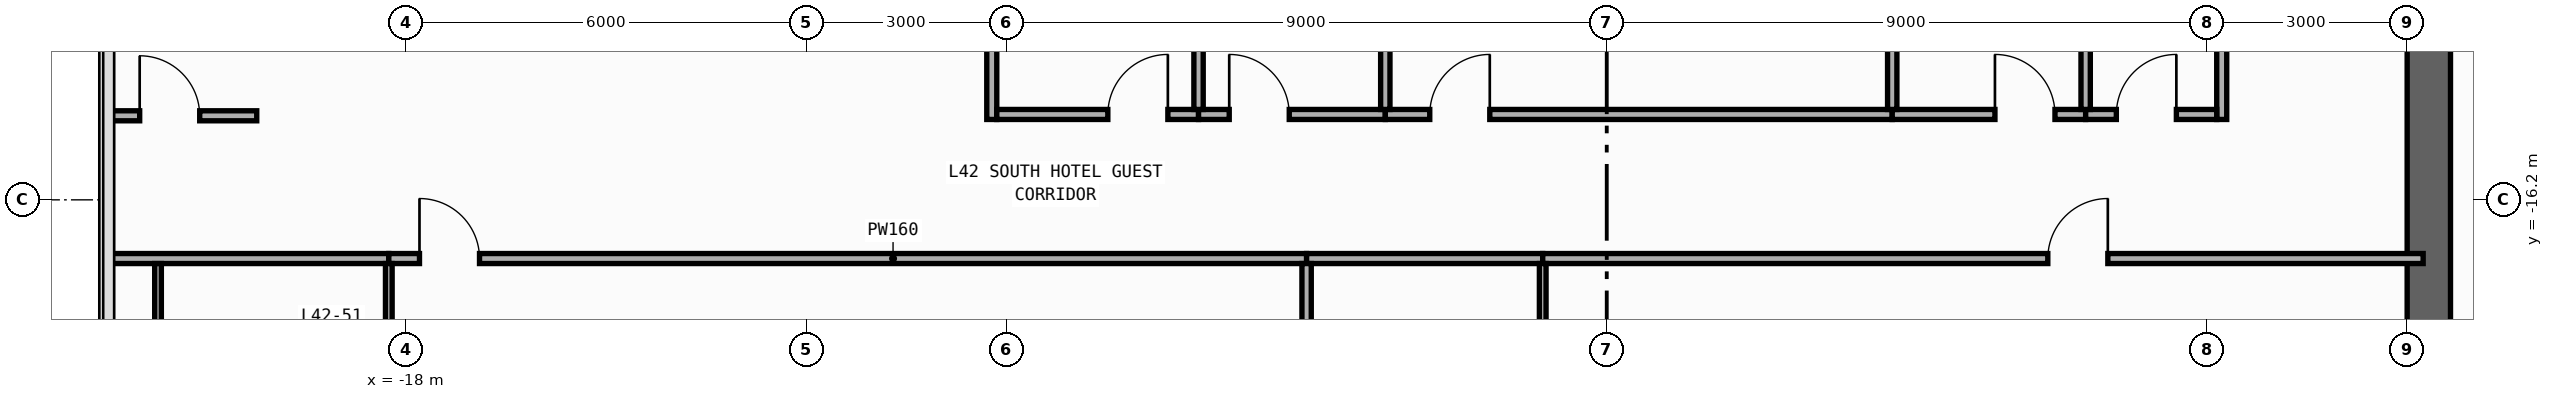
"""IFC4 building model, lengths in metres.
Left out: names, types, materials, properties, quantities, classifications, styles, units other than length and angle.
Written with IfcOpenShell. Run it as: python <this file> out.ifc"""

import sys

from ifc_helpers import new_model, si_unit, direction, frame, frame_2d, origin, place, context, subcontext, project, spatial, rectangle, extrude, element, fill, save


model = new_model("IFC4")
c1 = context("Model", 3, precision=1e-05, world=origin(), true_north=direction((0.0, 1.0)))
c2 = subcontext(c1, "Body", "Model", "MODEL_VIEW")
j1 = project(units=[si_unit("LENGTHUNIT", "METRE"), si_unit("PLANEANGLEUNIT", "RADIAN")], contexts=[c1])
p1 = place(None, origin())
s1 = spatial("IfcSite", under=j1, at=p1, CompositionType="ELEMENT")
p2 = place(p1, origin())
s2 = spatial("IfcBuilding", under=s1, at=p2, CompositionType="ELEMENT")
p3 = place(p2, frame((0.0, 0.0, 184.0)))
s3 = spatial("IfcBuildingStorey", under=s2, at=p3, CompositionType="ELEMENT", Elevation=184.0)
p4 = place(p3, frame((12.325, -19.8, 0.0), z_axis=(0.0, 0.0, 1.0), x_axis=(0.0, 1.0, 0.0)))
e1 = element("IfcWall", 1, at=p4, inside=s3, PredefinedType="SHEAR", context=c2, shape_type="SweptSolid", body=[
    extrude(rectangle(XDim=27.0, YDim=0.65, at=frame_2d((13.5, 0.0))), origin(), (0.0, 0.0, 1.0), 3.54),
])
p5 = place(p4, frame((23.05, 0.0, 0.0)))
e2 = element("IfcOpeningElement", 2, at=p5, cuts=e1, PredefinedType="OPENING", context=c2, shape_type="SweptSolid", body=[
    extrude(rectangle(XDim=1.1, YDim=2.2, at=frame_2d((0.55, 1.1))), frame((0.0, 0.335, 0.0), z_axis=(0.0, -1.0, 0.0), x_axis=(1.0, 0.0, 0.0)), (0.0, 0.0, 1.0), 0.67),
])
p6 = place(p4, frame((19.85, 0.0, 0.0)))
e3 = element("IfcOpeningElement", 3, at=p6, cuts=e1, PredefinedType="OPENING", context=c2, shape_type="SweptSolid", body=[
    extrude(rectangle(XDim=1.1, YDim=2.2, at=frame_2d((0.55, 1.1))), frame((0.0, 0.335, 0.0), z_axis=(0.0, -1.0, 0.0), x_axis=(1.0, 0.0, 0.0)), (0.0, 0.0, 1.0), 0.67),
])
p7 = place(p4, frame((16.65, 0.0, 0.0)))
e4 = element("IfcOpeningElement", 4, at=p7, cuts=e1, PredefinedType="OPENING", context=c2, shape_type="SweptSolid", body=[
    extrude(rectangle(XDim=1.1, YDim=2.2, at=frame_2d((0.55, 1.1))), frame((0.0, 0.335, 0.0), z_axis=(0.0, -1.0, 0.0), x_axis=(1.0, 0.0, 0.0)), (0.0, 0.0, 1.0), 0.67),
])
p8 = place(p4, frame((6.275, 0.0, 0.0)))
e5 = element("IfcOpeningElement", 5, at=p8, cuts=e1, PredefinedType="OPENING", context=c2, shape_type="SweptSolid", body=[
    extrude(rectangle(XDim=0.85, YDim=2.1, at=frame_2d((0.425, 1.05))), frame((0.0, 0.335, 0.0), z_axis=(0.0, -1.0, 0.0), x_axis=(1.0, 0.0, 0.0)), (0.0, 0.0, 1.0), 0.67),
])
p9 = place(p4, frame((8.575, 0.0, 0.0)))
e6 = element("IfcOpeningElement", 6, at=p9, cuts=e1, PredefinedType="OPENING", context=c2, shape_type="SweptSolid", body=[
    extrude(rectangle(XDim=0.85, YDim=2.1, at=frame_2d((0.425, 1.05))), frame((0.0, 0.335, 0.0), z_axis=(0.0, -1.0, 0.0), x_axis=(1.0, 0.0, 0.0)), (0.0, 0.0, 1.0), 0.67),
])
p10 = place(p4, frame((10.675, 0.0, 0.0)))
e7 = element("IfcOpeningElement", 7, at=p10, cuts=e1, PredefinedType="OPENING", context=c2, shape_type="SweptSolid", body=[
    extrude(rectangle(XDim=0.85, YDim=2.1, at=frame_2d((0.425, 1.05))), frame((0.0, 0.335, 0.0), z_axis=(0.0, -1.0, 0.0), x_axis=(1.0, 0.0, 0.0)), (0.0, 0.0, 1.0), 0.67),
])
p11 = place(p4, frame((12.725, 0.0, 0.0)))
e8 = element("IfcOpeningElement", 8, at=p11, cuts=e1, PredefinedType="OPENING", context=c2, shape_type="SweptSolid", body=[
    extrude(rectangle(XDim=1.15, YDim=2.2, at=frame_2d((0.575, 1.1))), frame((0.0, 0.335, 0.0), z_axis=(0.0, -1.0, 0.0), x_axis=(1.0, 0.0, 0.0)), (0.0, 0.0, 1.0), 0.67),
])
p12 = place(p4, frame((25.125, 0.0, 0.0)))
e9 = element("IfcOpeningElement", 9, at=p12, cuts=e1, PredefinedType="OPENING", context=c2, shape_type="SweptSolid", body=[
    extrude(rectangle(XDim=0.85, YDim=2.1, at=frame_2d((0.425, 1.05))), frame((0.0, 0.335, 0.0), z_axis=(0.0, -1.0, 0.0), x_axis=(1.0, 0.0, 0.0)), (0.0, 0.0, 1.0), 0.67),
])
p13 = place(p3, frame((-9.22, -14.995, 0.0), z_axis=(0.0, 0.0, 1.0), x_axis=(0.0, 1.0, 0.0)))
e10 = element("IfcWall", 10, at=p13, inside=s3, PredefinedType="PARTITIONING", context=c2, shape_type="SweptSolid", body=[
    extrude(rectangle(XDim=9.195, YDim=0.15, at=frame_2d((4.598, 0.0))), origin(), (0.0, 0.0, 1.0), 2.952),
])
p14 = place(p13, frame((7.835, 0.0, 0.0)))
e11 = element("IfcOpeningElement", 11, at=p14, cuts=e10, PredefinedType="OPENING", context=c2, shape_type="SweptSolid", body=[
    extrude(rectangle(XDim=0.9, YDim=2.15, at=frame_2d((0.45, 1.075))), frame((0.0, 0.085, 0.0), z_axis=(0.0, -1.0, 0.0), x_axis=(1.0, 0.0, 0.0)), (0.0, 0.0, 1.0), 0.17),
])
p15 = place(p3, frame((9.22, -14.995, 0.0), z_axis=(0.0, 0.0, 1.0), x_axis=(0.0, 1.0, 0.0)))
e12 = element("IfcWall", 12, at=p15, inside=s3, PredefinedType="PARTITIONING", context=c2, shape_type="SweptSolid", body=[
    extrude(rectangle(XDim=9.195, YDim=0.15, at=frame_2d((4.598, 0.0))), origin(), (0.0, 0.0, 1.0), 2.952),
])
p16 = place(p15, frame((7.835, 0.0, 0.0)))
e13 = element("IfcOpeningElement", 13, at=p16, cuts=e12, PredefinedType="OPENING", context=c2, shape_type="SweptSolid", body=[
    extrude(rectangle(XDim=0.9, YDim=2.15, at=frame_2d((0.45, 1.075))), frame((0.0, 0.085, 0.0), z_axis=(0.0, -1.0, 0.0), x_axis=(1.0, 0.0, 0.0)), (0.0, 0.0, 1.0), 0.17),
])
p17 = place(p3, frame((-9.145, -14.92, 0.0), z_axis=(0.0, 0.0, 1.0), x_axis=(1.0, 0.0, 0.0)))
e14 = element("IfcWall", 14, at=p17, inside=s3, PredefinedType="PARTITIONING", context=c2, shape_type="SweptSolid", body=[
    extrude(rectangle(XDim=3.025, YDim=0.15, at=frame_2d((1.512, 0.0))), origin(), (0.0, 0.0, 1.0), 3.54),
])
p18 = place(p17, frame((1.665, 0.0, 0.0)))
e15 = element("IfcOpeningElement", 15, at=p18, cuts=e14, PredefinedType="OPENING", context=c2, shape_type="SweptSolid", body=[
    extrude(rectangle(XDim=0.9, YDim=2.15, at=frame_2d((0.45, 1.075))), frame((0.0, 0.085, 0.0), z_axis=(0.0, -1.0, 0.0), x_axis=(1.0, 0.0, 0.0)), (0.0, 0.0, 1.0), 0.17),
])
p19 = place(p3, frame((-6.12, -14.92, 0.0), z_axis=(0.0, 0.0, 1.0), x_axis=(1.0, 0.0, 0.0)))
e16 = element("IfcWall", 16, at=p19, inside=s3, PredefinedType="PARTITIONING", context=c2, shape_type="SweptSolid", body=[
    extrude(rectangle(XDim=2.8, YDim=0.15, at=frame_2d((1.4, 0.0))), origin(), (0.0, 0.0, 1.0), 3.54),
])
p20 = place(p19, frame((0.46, 0.0, 0.0)))
e17 = element("IfcOpeningElement", 17, at=p20, cuts=e16, PredefinedType="OPENING", context=c2, shape_type="SweptSolid", body=[
    extrude(rectangle(XDim=0.9, YDim=2.15, at=frame_2d((0.45, 1.075))), frame((0.0, 0.085, 0.0), z_axis=(0.0, -1.0, 0.0), x_axis=(1.0, 0.0, 0.0)), (0.0, 0.0, 1.0), 0.17),
])
p21 = place(p3, frame((-3.32, -14.92, 0.0), z_axis=(0.0, 0.0, 1.0), x_axis=(1.0, 0.0, 0.0)))
e18 = element("IfcWall", 18, at=p21, inside=s3, PredefinedType="PARTITIONING", context=c2, shape_type="SweptSolid", body=[
    extrude(rectangle(XDim=7.6, YDim=0.15, at=frame_2d((3.8, 0.0))), origin(), (0.0, 0.0, 1.0), 3.54),
])
p22 = place(p21, frame((0.667, 0.0, 0.0)))
e19 = element("IfcOpeningElement", 19, at=p22, cuts=e18, PredefinedType="OPENING", context=c2, shape_type="SweptSolid", body=[
    extrude(rectangle(XDim=0.9, YDim=2.15, at=frame_2d((0.45, 1.075))), frame((0.0, 0.085, 0.0), z_axis=(0.0, -1.0, 0.0), x_axis=(1.0, 0.0, 0.0)), (0.0, 0.0, 1.0), 0.17),
])
p23 = place(p3, frame((4.28, -14.92, 0.0), z_axis=(0.0, 0.0, 1.0), x_axis=(1.0, 0.0, 0.0)))
e20 = element("IfcWall", 20, at=p23, inside=s3, PredefinedType="PARTITIONING", context=c2, shape_type="SweptSolid", body=[
    extrude(rectangle(XDim=2.9, YDim=0.15, at=frame_2d((1.45, 0.0))), origin(), (0.0, 0.0, 1.0), 3.54),
])
p24 = place(p23, frame((1.54, 0.0, 0.0)))
e21 = element("IfcOpeningElement", 21, at=p24, cuts=e20, PredefinedType="OPENING", context=c2, shape_type="SweptSolid", body=[
    extrude(rectangle(XDim=0.9, YDim=2.15, at=frame_2d((0.45, 1.075))), frame((0.0, 0.085, 0.0), z_axis=(0.0, -1.0, 0.0), x_axis=(1.0, 0.0, 0.0)), (0.0, 0.0, 1.0), 0.17),
])
p25 = place(p3, frame((7.18, -14.92, 0.0), z_axis=(0.0, 0.0, 1.0), x_axis=(1.0, 0.0, 0.0)))
e22 = element("IfcWall", 22, at=p25, inside=s3, PredefinedType="PARTITIONING", context=c2, shape_type="SweptSolid", body=[
    extrude(rectangle(XDim=1.965, YDim=0.15, at=frame_2d((0.982, 0.0))), origin(), (0.0, 0.0, 1.0), 3.54),
])
p26 = place(p25, frame((0.46, 0.0, 0.0)))
e23 = element("IfcOpeningElement", 23, at=p26, cuts=e22, PredefinedType="OPENING", context=c2, shape_type="SweptSolid", body=[
    extrude(rectangle(XDim=0.9, YDim=2.15, at=frame_2d((0.45, 1.075))), frame((0.0, 0.085, 0.0), z_axis=(0.0, -1.0, 0.0), x_axis=(1.0, 0.0, 0.0)), (0.0, 0.0, 1.0), 0.17),
])
p27 = place(p3, frame((-22.455, -17.08, 0.0), z_axis=(0.0, 0.0, 1.0), x_axis=(1.0, 0.0, 0.0)))
e24 = element("IfcWall", 24, at=p27, inside=s3, PredefinedType="PARTITIONING", context=c2, shape_type="SweptSolid", body=[
    extrude(rectangle(XDim=4.195, YDim=0.15, at=frame_2d((2.098, 0.0))), origin(), (0.0, 0.0, 1.0), 3.54),
])
p28 = place(p3, frame((-18.26, -17.08, 0.0), z_axis=(0.0, 0.0, 1.0), x_axis=(1.0, 0.0, 0.0)))
e25 = element("IfcWall", 25, at=p28, inside=s3, PredefinedType="PARTITIONING", context=c2, shape_type="SweptSolid", body=[
    extrude(rectangle(XDim=13.76, YDim=0.15, at=frame_2d((6.88, 0.0))), origin(), (0.0, 0.0, 1.0), 3.54),
])
p29 = place(p28, frame((0.46, 0.0, 0.0)))
e26 = element("IfcOpeningElement", 26, at=p29, cuts=e25, PredefinedType="OPENING", context=c2, shape_type="SweptSolid", body=[
    extrude(rectangle(XDim=0.9, YDim=2.15, at=frame_2d((0.45, 1.075))), frame((0.0, 0.085, 0.0), z_axis=(0.0, -1.0, 0.0), x_axis=(1.0, 0.0, 0.0)), (0.0, 0.0, 1.0), 0.17),
])
p30 = place(p3, frame((-4.5, -17.08, 0.0), z_axis=(0.0, 0.0, 1.0), x_axis=(1.0, 0.0, 0.0)))
e27 = element("IfcWall", 27, at=p30, inside=s3, PredefinedType="PARTITIONING", context=c2, shape_type="SweptSolid", body=[
    extrude(rectangle(XDim=3.54, YDim=0.15, at=frame_2d((1.77, 0.0))), origin(), (0.0, 0.0, 1.0), 3.54),
])
p31 = place(p3, frame((-0.96, -17.08, 0.0), z_axis=(0.0, 0.0, 1.0), x_axis=(1.0, 0.0, 0.0)))
e28 = element("IfcWall", 28, at=p31, inside=s3, PredefinedType="PARTITIONING", context=c2, shape_type="SweptSolid", body=[
    extrude(rectangle(XDim=13.2, YDim=0.15, at=frame_2d((6.6, 0.0))), origin(), (0.0, 0.0, 1.0), 3.54),
])
p32 = place(p31, frame((7.573, 0.0, 0.0)))
e29 = element("IfcOpeningElement", 29, at=p32, cuts=e28, PredefinedType="OPENING", context=c2, shape_type="SweptSolid", body=[
    extrude(rectangle(XDim=0.9, YDim=2.15, at=frame_2d((0.45, 1.075))), frame((0.0, 0.085, 0.0), z_axis=(0.0, -1.0, 0.0), x_axis=(1.0, 0.0, 0.0)), (0.0, 0.0, 1.0), 0.17),
])
p33 = place(p3, frame((-22.455, -14.94, 0.0), z_axis=(0.0, 0.0, 1.0), x_axis=(1.0, 0.0, 0.0)))
e30 = element("IfcWall", 30, at=p33, inside=s3, PredefinedType="PARTITIONING", context=c2, shape_type="SweptSolid", body=[
    extrude(rectangle(XDim=2.215, YDim=0.15, at=frame_2d((1.107, 0.0))), origin(), (0.0, 0.0, 1.0), 3.54),
])
p34 = place(p33, frame((0.46, 0.0, 0.0)))
e31 = element("IfcOpeningElement", 31, at=p34, cuts=e30, PredefinedType="OPENING", context=c2, shape_type="SweptSolid", body=[
    extrude(rectangle(XDim=0.9, YDim=2.15, at=frame_2d((0.45, 1.075))), frame((0.0, 0.085, 0.0), z_axis=(0.0, -1.0, 0.0), x_axis=(1.0, 0.0, 0.0)), (0.0, 0.0, 1.0), 0.17),
])
p35 = place(p3, frame((-6.12, -14.845, 0.0), z_axis=(0.0, 0.0, 1.0), x_axis=(0.0, 1.0, 0.0)))
e32 = element("IfcWall", 32, at=p35, inside=s3, PredefinedType="PARTITIONING", context=c2, shape_type="SweptSolid", body=[
    extrude(rectangle(XDim=8.975, YDim=0.14, at=frame_2d((4.487, 0.0))), origin(), (0.0, 0.0, 1.0), 3.54),
])
p36 = place(p3, frame((-3.32, -14.845, 0.0), z_axis=(0.0, 0.0, 1.0), x_axis=(0.0, 1.0, 0.0)))
e33 = element("IfcWall", 33, at=p36, inside=s3, PredefinedType="PARTITIONING", context=c2, shape_type="SweptSolid", body=[
    extrude(rectangle(XDim=9.115, YDim=0.14, at=frame_2d((4.558, 0.0))), origin(), (0.0, 0.0, 1.0), 3.54),
])
for number, where, z_axis, x_axis in (
    (34, (4.28, -14.845, 0.0), (0.0, 0.0, 1.0), (0.0, 1.0, 0.0)),
    (35, (7.18, -14.845, 0.0), (0.0, 0.0, 1.0), (0.0, 1.0, 0.0)),
):
    element("IfcWall", number, at=place(p3, frame(where, z_axis=z_axis, x_axis=x_axis)), inside=s3, PredefinedType="PARTITIONING", context=c2, shape_type="SweptSolid", body=[
        extrude(rectangle(XDim=2.885, YDim=0.14, at=frame_2d((1.442, 0.0))), origin(), (0.0, 0.0, 1.0), 3.54),
    ])
p37 = place(p3, frame((-18.26, -20.12, 0.0), z_axis=(0.0, 0.0, 1.0), x_axis=(0.0, 1.0, 0.0)))
e36 = element("IfcWall", 36, at=p37, inside=s3, PredefinedType="PARTITIONING", context=c2, shape_type="SweptSolid", body=[
    extrude(rectangle(XDim=2.965, YDim=0.1, at=frame_2d((1.482, 0.0))), origin(), (0.0, 0.0, 1.0), 3.54),
])
p38 = place(p37, frame((0.46, 0.0, 0.0)))
e37 = element("IfcOpeningElement", 37, at=p38, cuts=e36, PredefinedType="OPENING", context=c2, shape_type="SweptSolid", body=[
    extrude(rectangle(XDim=0.8, YDim=2.1, at=frame_2d((0.4, 1.05))), frame((0.0, 0.06, 0.0), z_axis=(0.0, -1.0, 0.0), x_axis=(1.0, 0.0, 0.0)), (0.0, 0.0, 1.0), 0.12),
])
p39 = place(p3, frame((-4.5, -20.17, 0.0), z_axis=(0.0, 0.0, 1.0), x_axis=(0.0, 1.0, 0.0)))
e38 = element("IfcWall", 38, at=p39, inside=s3, PredefinedType="PARTITIONING", context=c2, shape_type="SweptSolid", body=[
    extrude(rectangle(XDim=3.015, YDim=0.14, at=frame_2d((1.507, 0.0))), origin(), (0.0, 0.0, 1.0), 3.54),
])
for number, where, z_axis, x_axis in (
    (39, (-0.96, -20.12, 0.0), (0.0, 0.0, 1.0), (0.0, 1.0, 0.0)),
    (40, (-21.72, -20.12, 0.0), (0.0, 0.0, 1.0), (0.0, 1.0, 0.0)),
):
    element("IfcWall", number, at=place(p3, frame(where, z_axis=z_axis, x_axis=x_axis)), inside=s3, PredefinedType="PARTITIONING", context=c2, shape_type="SweptSolid", body=[
        extrude(rectangle(XDim=2.965, YDim=0.1, at=frame_2d((1.482, 0.0))), origin(), (0.0, 0.0, 1.0), 3.54),
    ])
p40 = place(p18, origin())
e41 = element("IfcDoor", 41, at=p40, inside=s3, OperationType="SINGLE_SWING_RIGHT", PredefinedType="DOOR", context=c2, shape_type="SweptSolid", body=[
    extrude(rectangle(XDim=0.9, YDim=2.15, at=frame_2d((0.45, 1.075))), frame((0.0, 0.025, 0.0), z_axis=(0.0, -1.0, 0.0), x_axis=(1.0, 0.0, 0.0)), (0.0, 0.0, 1.0), 0.05),
])
fill(e15, e41)
p41 = place(p20, origin())
e42 = element("IfcDoor", 42, at=p41, inside=s3, OperationType="SINGLE_SWING_LEFT", PredefinedType="DOOR", context=c2, shape_type="SweptSolid", body=[
    extrude(rectangle(XDim=0.9, YDim=2.15, at=frame_2d((0.45, 1.075))), frame((0.0, 0.025, 0.0), z_axis=(0.0, -1.0, 0.0), x_axis=(1.0, 0.0, 0.0)), (0.0, 0.0, 1.0), 0.05),
])
fill(e17, e42)
p42 = place(p22, origin())
e43 = element("IfcDoor", 43, at=p42, inside=s3, OperationType="SINGLE_SWING_RIGHT", PredefinedType="DOOR", context=c2, shape_type="SweptSolid", body=[
    extrude(rectangle(XDim=0.9, YDim=2.15, at=frame_2d((0.45, 1.075))), frame((0.0, 0.025, 0.0), z_axis=(0.0, -1.0, 0.0), x_axis=(1.0, 0.0, 0.0)), (0.0, 0.0, 1.0), 0.05),
])
fill(e19, e43)
p43 = place(p24, origin())
e44 = element("IfcDoor", 44, at=p43, inside=s3, OperationType="SINGLE_SWING_LEFT", PredefinedType="DOOR", context=c2, shape_type="SweptSolid", body=[
    extrude(rectangle(XDim=0.9, YDim=2.15, at=frame_2d((0.45, 1.075))), frame((0.0, 0.025, 0.0), z_axis=(0.0, -1.0, 0.0), x_axis=(1.0, 0.0, 0.0)), (0.0, 0.0, 1.0), 0.05),
])
fill(e21, e44)
p44 = place(p26, origin())
e45 = element("IfcDoor", 45, at=p44, inside=s3, OperationType="SINGLE_SWING_RIGHT", PredefinedType="DOOR", context=c2, shape_type="SweptSolid", body=[
    extrude(rectangle(XDim=0.9, YDim=2.15, at=frame_2d((0.45, 1.075))), frame((0.0, 0.025, 0.0), z_axis=(0.0, -1.0, 0.0), x_axis=(1.0, 0.0, 0.0)), (0.0, 0.0, 1.0), 0.05),
])
fill(e23, e45)
p45 = place(p29, origin())
e46 = element("IfcDoor", 46, at=p45, inside=s3, OperationType="SINGLE_SWING_LEFT", PredefinedType="DOOR", context=c2, shape_type="SweptSolid", body=[
    extrude(rectangle(XDim=0.9, YDim=2.15, at=frame_2d((0.45, 1.075))), frame((0.0, 0.025, 0.0), z_axis=(0.0, -1.0, 0.0), x_axis=(1.0, 0.0, 0.0)), (0.0, 0.0, 1.0), 0.05),
])
fill(e26, e46)
p46 = place(p32, origin())
e47 = element("IfcDoor", 47, at=p46, inside=s3, OperationType="SINGLE_SWING_RIGHT", PredefinedType="DOOR", context=c2, shape_type="SweptSolid", body=[
    extrude(rectangle(XDim=0.9, YDim=2.15, at=frame_2d((0.45, 1.075))), frame((0.0, 0.025, 0.0), z_axis=(0.0, -1.0, 0.0), x_axis=(1.0, 0.0, 0.0)), (0.0, 0.0, 1.0), 0.05),
])
fill(e29, e47)
p47 = place(p34, origin())
e48 = element("IfcDoor", 48, at=p47, inside=s3, OperationType="SINGLE_SWING_LEFT", PredefinedType="DOOR", context=c2, shape_type="SweptSolid", body=[
    extrude(rectangle(XDim=0.9, YDim=2.15, at=frame_2d((0.45, 1.075))), frame((0.0, 0.025, 0.0), z_axis=(0.0, -1.0, 0.0), x_axis=(1.0, 0.0, 0.0)), (0.0, 0.0, 1.0), 0.05),
])
fill(e31, e48)
save(model, sys.argv[1])
